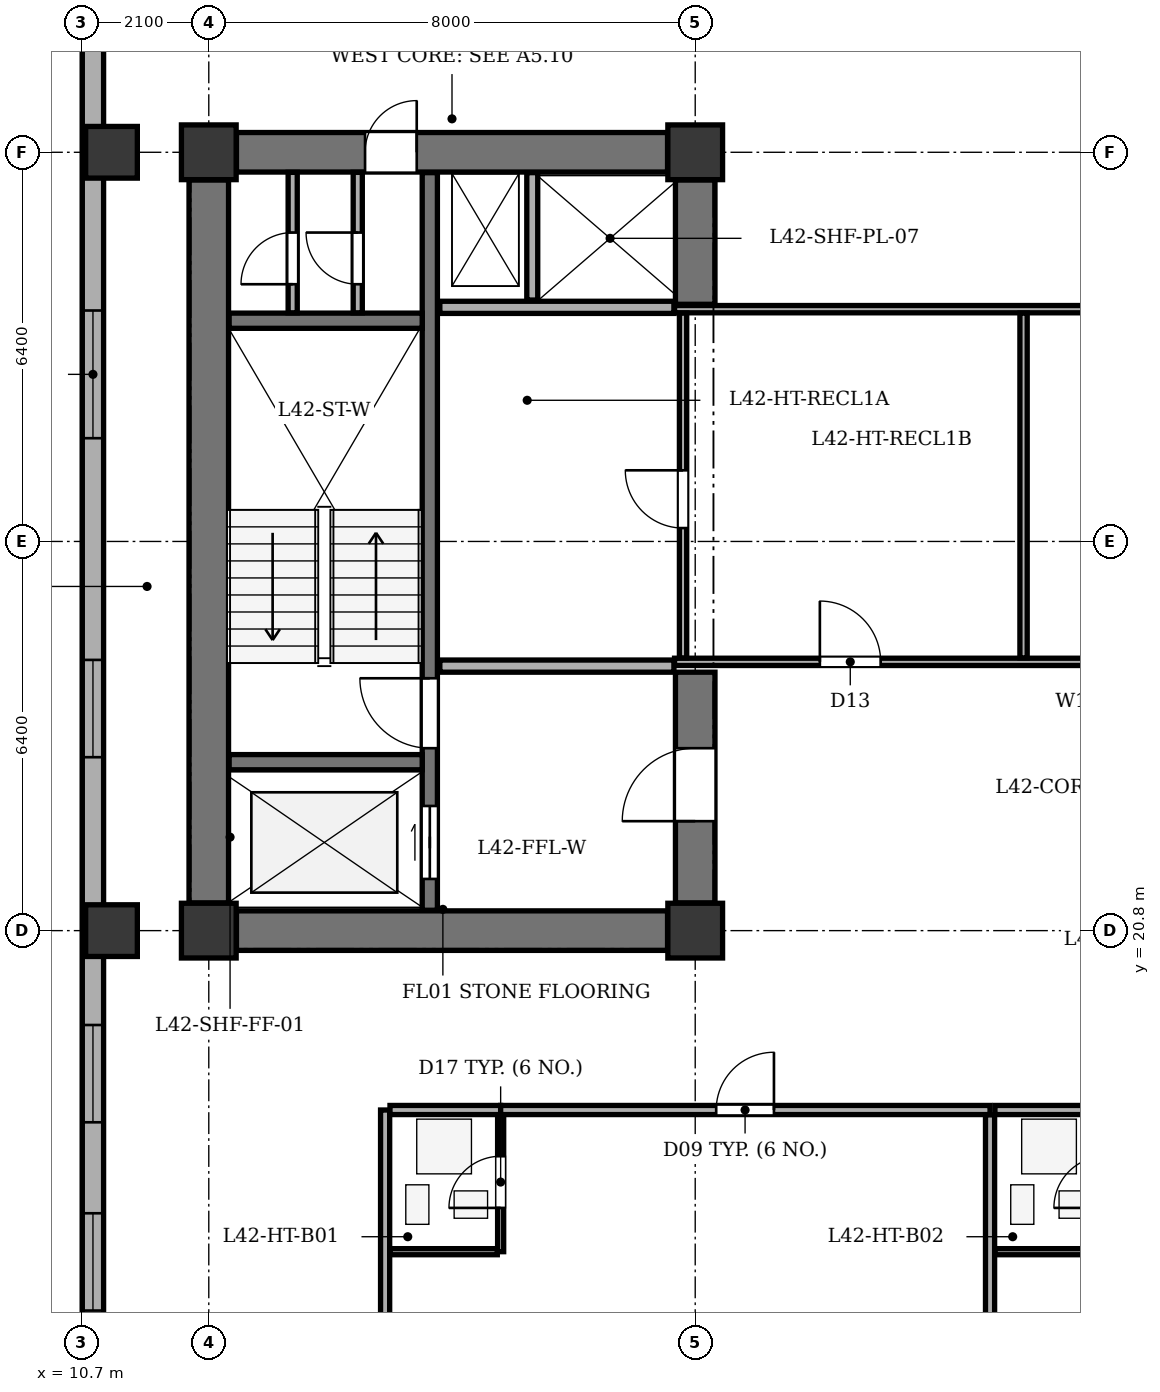
"""IFC4 building model, lengths in metres.
Left out: names, types, materials, properties, quantities, classifications, styles, units other than length and angle.
Written with IfcOpenShell. Run it as: python <this file> out.ifc"""

import sys

from ifc_helpers import new_model, si_unit, direction, frame, frame_2d, origin, origin_2d, place, context, subcontext, project, spatial, rectangle, extrude, element, fill, save


model = new_model("IFC4")
c1 = context("Model", 3, precision=1e-05, world=origin(), true_north=direction((0.0, 1.0)))
c2 = subcontext(c1, "Body", "Model", "MODEL_VIEW")
j1 = project(units=[si_unit("LENGTHUNIT", "METRE"), si_unit("PLANEANGLEUNIT", "RADIAN")], contexts=[c1])
p1 = place(None, origin())
s1 = spatial("IfcSite", under=j1, at=p1, CompositionType="ELEMENT")
p2 = place(p1, origin())
s2 = spatial("IfcBuilding", under=s1, at=p2, CompositionType="ELEMENT")
p3 = place(p2, frame((0.0, 0.0, 165.8)))
s3 = spatial("IfcBuildingStorey", under=s2, at=p3, CompositionType="ELEMENT", Elevation=165.8)
for number, where, z_axis, x_axis in (
    (1, (12.8, 20.8, 0.0), (0.0, 0.0, 1.0), (1.0, 0.0, 0.0)),
    (2, (20.8, 20.8, 0.0), (0.0, 0.0, 1.0), (1.0, 0.0, 0.0)),
    (3, (12.8, 33.6, 0.0), (0.0, 0.0, 1.0), (1.0, 0.0, 0.0)),
    (4, (20.8, 33.6, 0.0), (0.0, 0.0, 1.0), (1.0, 0.0, 0.0)),
):
    element("IfcColumn", number, at=place(p3, frame(where, z_axis=z_axis, x_axis=x_axis)), inside=s3, PredefinedType="COLUMN", context=c2, shape_type="SweptSolid", body=[
        extrude(rectangle(XDim=0.9, YDim=0.9, at=origin_2d()), origin(), (0.0, 0.0, 1.0), 3.5),
    ])
for number, where, z_axis, x_axis in (
    (5, (11.2, 20.8, 0.0), (0.0, 0.0, 1.0), (1.0, 0.0, 0.0)),
    (6, (11.2, 33.6, 0.0), (0.0, 0.0, 1.0), (1.0, 0.0, 0.0)),
):
    element("IfcColumn", number, at=place(p3, frame(where, z_axis=z_axis, x_axis=x_axis)), inside=s3, PredefinedType="COLUMN", context=c2, shape_type="SweptSolid", body=[
        extrude(rectangle(XDim=0.85, YDim=0.85, at=origin_2d()), origin(), (0.0, 0.0, 1.0), 3.5),
    ])
p4 = place(p3, frame((10.895, 12.9, 0.0), z_axis=(0.0, 0.0, 1.0), x_axis=(0.0, 1.0, 0.0)))
e7 = element("IfcWall", 7, at=p4, inside=s3, PredefinedType="STANDARD", context=c2, shape_type="SweptSolid", body=[
    extrude(rectangle(XDim=35.0, YDim=0.35, at=frame_2d((17.5, 0.0))), origin(), (0.0, 0.0, 1.0), 2.785),
])
p5 = place(p4, frame((1.652, 0.0, 0.75)))
e8 = element("IfcOpeningElement", 8, at=p5, cuts=e7, PredefinedType="OPENING", context=c2, shape_type="SweptSolid", body=[
    extrude(rectangle(XDim=1.6, YDim=1.75, at=frame_2d((0.8, 0.875))), frame((0.0, 0.185, 0.0), z_axis=(0.0, -1.0, 0.0), x_axis=(1.0, 0.0, 0.0)), (0.0, 0.0, 1.0), 0.37),
])
p6 = place(p4, frame((4.748, 0.0, 0.75)))
e9 = element("IfcOpeningElement", 9, at=p6, cuts=e7, PredefinedType="OPENING", context=c2, shape_type="SweptSolid", body=[
    extrude(rectangle(XDim=1.6, YDim=1.75, at=frame_2d((0.8, 0.875))), frame((0.0, 0.185, 0.0), z_axis=(0.0, -1.0, 0.0), x_axis=(1.0, 0.0, 0.0)), (0.0, 0.0, 1.0), 0.37),
])
p7 = place(p4, frame((10.752, 0.0, 0.75)))
e10 = element("IfcOpeningElement", 10, at=p7, cuts=e7, PredefinedType="OPENING", context=c2, shape_type="SweptSolid", body=[
    extrude(rectangle(XDim=1.6, YDim=1.75, at=frame_2d((0.8, 0.875))), frame((0.0, 0.185, 0.0), z_axis=(0.0, -1.0, 0.0), x_axis=(1.0, 0.0, 0.0)), (0.0, 0.0, 1.0), 0.37),
])
p8 = place(p4, frame((15.998, 0.0, 0.75)))
e11 = element("IfcOpeningElement", 11, at=p8, cuts=e7, PredefinedType="OPENING", context=c2, shape_type="SweptSolid", body=[
    extrude(rectangle(XDim=2.1, YDim=1.75, at=frame_2d((1.05, 0.875))), frame((0.0, 0.185, 0.0), z_axis=(0.0, -1.0, 0.0), x_axis=(1.0, 0.0, 0.0)), (0.0, 0.0, 1.0), 0.37),
])
p9 = place(p4, frame((23.916, 0.0, 0.75)))
e12 = element("IfcOpeningElement", 12, at=p9, cuts=e7, PredefinedType="OPENING", context=c2, shape_type="SweptSolid", body=[
    extrude(rectangle(XDim=1.6, YDim=1.75, at=frame_2d((0.8, 0.875))), frame((0.0, 0.185, 0.0), z_axis=(0.0, -1.0, 0.0), x_axis=(1.0, 0.0, 0.0)), (0.0, 0.0, 1.0), 0.37),
])
p10 = place(p4, frame((29.834, 0.0, 0.75)))
e13 = element("IfcOpeningElement", 13, at=p10, cuts=e7, PredefinedType="OPENING", context=c2, shape_type="SweptSolid", body=[
    extrude(rectangle(XDim=2.1, YDim=1.75, at=frame_2d((1.05, 0.875))), frame((0.0, 0.185, 0.0), z_axis=(0.0, -1.0, 0.0), x_axis=(1.0, 0.0, 0.0)), (0.0, 0.0, 1.0), 0.37),
])
p11 = place(p3, frame((12.8, 21.255, 0.0), z_axis=(0.0, 0.0, 1.0), x_axis=(0.0, 1.0, 0.0)))
e14 = element("IfcWall", 14, at=p11, inside=s3, PredefinedType="SHEAR", context=c2, shape_type="SweptSolid", body=[
    extrude(rectangle(XDim=11.89, YDim=0.65, at=frame_2d((5.945, 0.0))), origin(), (0.0, 0.0, 1.0), 3.2),
])
p12 = place(p3, frame((13.255, 20.8, 0.0), z_axis=(0.0, 0.0, 1.0), x_axis=(1.0, 0.0, 0.0)))
e15 = element("IfcWall", 15, at=p12, inside=s3, PredefinedType="SHEAR", context=c2, shape_type="SweptSolid", body=[
    extrude(rectangle(XDim=7.09, YDim=0.65, at=frame_2d((3.545, 0.0))), origin(), (0.0, 0.0, 1.0), 3.2),
])
p13 = place(p3, frame((13.255, 33.6, 0.0), z_axis=(0.0, 0.0, 1.0), x_axis=(1.0, 0.0, 0.0)))
e16 = element("IfcWall", 16, at=p13, inside=s3, PredefinedType="SHEAR", context=c2, shape_type="SweptSolid", body=[
    extrude(rectangle(XDim=7.09, YDim=0.65, at=frame_2d((3.545, 0.0))), origin(), (0.0, 0.0, 1.0), 3.2),
])
p14 = place(p13, frame((2.115, 0.0, 0.0)))
e17 = element("IfcOpeningElement", 17, at=p14, cuts=e16, PredefinedType="OPENING", context=c2, shape_type="SweptSolid", body=[
    extrude(rectangle(XDim=0.85, YDim=2.02, at=frame_2d((0.425, 1.01))), frame((0.0, 0.335, 0.0), z_axis=(0.0, -1.0, 0.0), x_axis=(1.0, 0.0, 0.0)), (0.0, 0.0, 1.0), 0.67),
])
p15 = place(p3, frame((20.8, 21.255, 0.0), z_axis=(0.0, 0.0, 1.0), x_axis=(0.0, 1.0, 0.0)))
e18 = element("IfcWall", 18, at=p15, inside=s3, PredefinedType="SHEAR", context=c2, shape_type="SweptSolid", body=[
    extrude(rectangle(XDim=3.795, YDim=0.65, at=frame_2d((1.897, 0.0))), origin(), (0.0, 0.0, 1.0), 3.2),
])
p16 = place(p15, frame((1.345, 0.0, 0.0)))
e19 = element("IfcOpeningElement", 19, at=p16, cuts=e18, PredefinedType="OPENING", context=c2, shape_type="SweptSolid", body=[
    extrude(rectangle(XDim=1.2, YDim=2.15, at=frame_2d((0.6, 1.075))), frame((0.0, 0.335, 0.0), z_axis=(0.0, -1.0, 0.0), x_axis=(1.0, 0.0, 0.0)), (0.0, 0.0, 1.0), 0.67),
])
p17 = place(p3, frame((20.8, 31.1, 0.0), z_axis=(0.0, 0.0, 1.0), x_axis=(0.0, 1.0, 0.0)))
e20 = element("IfcWall", 20, at=p17, inside=s3, PredefinedType="SHEAR", context=c2, shape_type="SweptSolid", body=[
    extrude(rectangle(XDim=2.045, YDim=0.65, at=frame_2d((1.022, 0.0))), origin(), (0.0, 0.0, 1.0), 3.2),
])
p18 = place(p3, frame((16.435, 21.135, 0.0), z_axis=(0.0, 0.0, 1.0), x_axis=(0.0, 1.0, 0.0)))
e21 = element("IfcWall", 21, at=p18, inside=s3, PredefinedType="SHEAR", context=c2, shape_type="SweptSolid", body=[
    extrude(rectangle(XDim=12.13, YDim=0.25, at=frame_2d((6.065, 0.0))), origin(), (0.0, 0.0, 1.0), 3.2),
])
p19 = place(p18, frame((0.515, 0.0, 0.0)))
e22 = element("IfcOpeningElement", 22, at=p19, cuts=e21, PredefinedType="OPENING", context=c2, shape_type="SweptSolid", body=[
    extrude(rectangle(XDim=1.2, YDim=2.15, at=frame_2d((0.6, 1.075))), frame((0.0, 0.135, 0.0), z_axis=(0.0, -1.0, 0.0), x_axis=(1.0, 0.0, 0.0)), (0.0, 0.0, 1.0), 0.27),
])
p20 = place(p18, frame((2.665, 0.0, 0.0)))
e23 = element("IfcOpeningElement", 23, at=p20, cuts=e21, PredefinedType="OPENING", context=c2, shape_type="SweptSolid", body=[
    extrude(rectangle(XDim=1.15, YDim=2.15, at=frame_2d((0.575, 1.075))), frame((0.0, 0.135, 0.0), z_axis=(0.0, -1.0, 0.0), x_axis=(1.0, 0.0, 0.0)), (0.0, 0.0, 1.0), 0.27),
])
for number, where, z_axis, x_axis in (
    (24, (13.135, 23.57, 0.0), (0.0, 0.0, 1.0), (1.0, 0.0, 0.0)),
    (25, (13.135, 30.83, 0.0), (0.0, 0.0, 1.0), (1.0, 0.0, 0.0)),
):
    element("IfcWall", number, at=place(p3, frame(where, z_axis=z_axis, x_axis=x_axis)), inside=s3, PredefinedType="SHEAR", context=c2, shape_type="SweptSolid", body=[
        extrude(rectangle(XDim=3.175, YDim=0.25, at=frame_2d((1.587, 0.0))), origin(), (0.0, 0.0, 1.0), 3.2),
    ])
for number, where, z_axis, x_axis in (
    (26, (16.6, 25.15, 0.0), (0.0, 0.0, 1.0), (1.0, 0.0, 0.0)),
    (27, (16.6, 31.05, 0.0), (0.0, 0.0, 1.0), (1.0, 0.0, 0.0)),
):
    element("IfcWall", number, at=place(p3, frame(where, z_axis=z_axis, x_axis=x_axis)), inside=s3, PredefinedType="SOLIDWALL", context=c2, shape_type="SweptSolid", body=[
        extrude(rectangle(XDim=3.85, YDim=0.2, at=frame_2d((1.925, 0.0))), origin(), (0.0, 0.0, 1.0), 3.2),
    ])
p21 = place(p3, frame((18.12, 31.17, 0.0), z_axis=(0.0, 0.0, 1.0), x_axis=(0.0, 1.0, 0.0)))
e28 = element("IfcWall", 28, at=p21, inside=s3, PredefinedType="PARTITIONING", context=c2, shape_type="SweptSolid", body=[
    extrude(rectangle(XDim=2.095, YDim=0.18, at=frame_2d((1.047, 0.0))), origin(), (0.0, 0.0, 1.0), 3.2),
])
p22 = place(p3, frame((14.18, 30.96, 0.0), z_axis=(0.0, 0.0, 1.0), x_axis=(0.0, 1.0, 0.0)))
e29 = element("IfcWall", 29, at=p22, inside=s3, PredefinedType="PARTITIONING", context=c2, shape_type="SweptSolid", body=[
    extrude(rectangle(XDim=2.31, YDim=0.15, at=frame_2d((1.155, 0.0))), origin(), (0.0, 0.0, 1.0), 3.2),
])
p23 = place(p22, frame((0.47, 0.0, 0.0)))
e30 = element("IfcOpeningElement", 30, at=p23, cuts=e29, PredefinedType="OPENING", context=c2, shape_type="SweptSolid", body=[
    extrude(rectangle(XDim=0.85, YDim=2.02, at=frame_2d((0.425, 1.01))), frame((0.0, 0.085, 0.0), z_axis=(0.0, -1.0, 0.0), x_axis=(1.0, 0.0, 0.0)), (0.0, 0.0, 1.0), 0.17),
])
p24 = place(p3, frame((15.25, 30.96, 0.0), z_axis=(0.0, 0.0, 1.0), x_axis=(0.0, 1.0, 0.0)))
e31 = element("IfcWall", 31, at=p24, inside=s3, PredefinedType="PARTITIONING", context=c2, shape_type="SweptSolid", body=[
    extrude(rectangle(XDim=2.31, YDim=0.15, at=frame_2d((1.155, 0.0))), origin(), (0.0, 0.0, 1.0), 3.2),
])
p25 = place(p24, frame((0.47, 0.0, 0.0)))
e32 = element("IfcOpeningElement", 32, at=p25, cuts=e31, PredefinedType="OPENING", context=c2, shape_type="SweptSolid", body=[
    extrude(rectangle(XDim=0.85, YDim=2.02, at=frame_2d((0.425, 1.01))), frame((0.0, 0.085, 0.0), z_axis=(0.0, -1.0, 0.0), x_axis=(1.0, 0.0, 0.0)), (0.0, 0.0, 1.0), 0.17),
])
p26 = place(p3, frame((20.46, 25.22, 0.0), z_axis=(0.0, 0.0, 1.0), x_axis=(1.0, 0.0, 0.0)))
e33 = element("IfcWall", 33, at=p26, inside=s3, PredefinedType="PARTITIONING", context=c2, shape_type="SweptSolid", body=[
    extrude(rectangle(XDim=11.94, YDim=0.12, at=frame_2d((5.97, 0.0))), origin(), (0.0, 0.0, 1.0), 3.2),
])
p27 = place(p26, frame((2.39, 0.0, 0.0)))
e34 = element("IfcOpeningElement", 34, at=p27, cuts=e33, PredefinedType="OPENING", context=c2, shape_type="SweptSolid", body=[
    extrude(rectangle(XDim=1.0, YDim=2.1, at=frame_2d((0.5, 1.05))), frame((0.0, 0.07, 0.0), z_axis=(0.0, -1.0, 0.0), x_axis=(1.0, 0.0, 0.0)), (0.0, 0.0, 1.0), 0.14),
])
p28 = place(p3, frame((20.46, 31.02, 0.0), z_axis=(0.0, 0.0, 1.0), x_axis=(1.0, 0.0, 0.0)))
e35 = element("IfcWall", 35, at=p28, inside=s3, PredefinedType="PARTITIONING", context=c2, shape_type="SweptSolid", body=[
    extrude(rectangle(XDim=11.94, YDim=0.12, at=frame_2d((5.97, 0.0))), origin(), (0.0, 0.0, 1.0), 3.2),
])
p29 = place(p3, frame((20.6, 25.285, 0.0), z_axis=(0.0, 0.0, 1.0), x_axis=(0.0, 1.0, 0.0)))
e36 = element("IfcWall", 36, at=p29, inside=s3, PredefinedType="PARTITIONING", context=c2, shape_type="SweptSolid", body=[
    extrude(rectangle(XDim=5.67, YDim=0.12, at=frame_2d((2.835, 0.0))), origin(), (0.0, 0.0, 1.0), 2.735),
])
p30 = place(p29, frame((2.135, 0.0, 0.0)))
e37 = element("IfcOpeningElement", 37, at=p30, cuts=e36, PredefinedType="OPENING", context=c2, shape_type="SweptSolid", body=[
    extrude(rectangle(XDim=0.95, YDim=2.1, at=frame_2d((0.475, 1.05))), frame((0.0, 0.07, 0.0), z_axis=(0.0, -1.0, 0.0), x_axis=(1.0, 0.0, 0.0)), (0.0, 0.0, 1.0), 0.14),
])
p31 = place(p3, frame((26.2, 25.285, 0.0), z_axis=(0.0, 0.0, 1.0), x_axis=(0.0, 1.0, 0.0)))
e38 = element("IfcWall", 38, at=p31, inside=s3, PredefinedType="PARTITIONING", context=c2, shape_type="SweptSolid", body=[
    extrude(rectangle(XDim=5.67, YDim=0.12, at=frame_2d((2.835, 0.0))), origin(), (0.0, 0.0, 1.0), 3.2),
])
p32 = place(p3, frame((15.7, 8.275, 0.0), z_axis=(0.0, 0.0, 1.0), x_axis=(0.0, 1.0, 0.0)))
e39 = element("IfcWall", 39, at=p32, inside=s3, PredefinedType="PARTITIONING", context=c2, shape_type="SweptSolid", body=[
    extrude(rectangle(XDim=9.575, YDim=0.15, at=frame_2d((4.788, 0.0))), origin(), (0.0, 0.0, 1.0), 3.2),
])
p33 = place(p3, frame((15.78, 17.85, 0.0), z_axis=(0.0, 0.0, 1.0), x_axis=(1.0, 0.0, 0.0)))
e40 = element("IfcWall", 40, at=p33, inside=s3, PredefinedType="PARTITIONING", context=c2, shape_type="SweptSolid", body=[
    extrude(rectangle(XDim=1.82, YDim=0.15, at=frame_2d((0.91, 0.0))), origin(), (0.0, 0.0, 1.0), 3.2),
])
p34 = place(p3, frame((17.6, 17.85, 0.0), z_axis=(0.0, 0.0, 1.0), x_axis=(1.0, 0.0, 0.0)))
e41 = element("IfcWall", 41, at=p34, inside=s3, PredefinedType="PARTITIONING", context=c2, shape_type="SweptSolid", body=[
    extrude(rectangle(XDim=8.049, YDim=0.15, at=frame_2d((4.024, 0.0))), origin(), (0.0, 0.0, 1.0), 3.2),
])
p35 = place(p34, frame((3.545, 0.0, 0.0)))
e42 = element("IfcOpeningElement", 42, at=p35, cuts=e41, PredefinedType="OPENING", context=c2, shape_type="SweptSolid", body=[
    extrude(rectangle(XDim=0.95, YDim=2.1, at=frame_2d((0.475, 1.05))), frame((0.0, 0.085, 0.0), z_axis=(0.0, -1.0, 0.0), x_axis=(1.0, 0.0, 0.0)), (0.0, 0.0, 1.0), 0.17),
])
p36 = place(p3, frame((17.6, 15.52, 0.0), z_axis=(0.0, 0.0, 1.0), x_axis=(0.0, 1.0, 0.0)))
e43 = element("IfcWall", 43, at=p36, inside=s3, PredefinedType="PARTITIONING", context=c2, shape_type="SweptSolid", body=[
    extrude(rectangle(XDim=2.25, YDim=0.1, at=frame_2d((1.125, 0.0))), origin(), (0.0, 0.0, 1.0), 3.2),
])
p37 = place(p36, frame((0.72, 0.0, 0.0)))
e44 = element("IfcOpeningElement", 44, at=p37, cuts=e43, PredefinedType="OPENING", context=c2, shape_type="SweptSolid", body=[
    extrude(rectangle(XDim=0.85, YDim=2.05, at=frame_2d((0.425, 1.025))), frame((0.0, 0.06, 0.0), z_axis=(0.0, -1.0, 0.0), x_axis=(1.0, 0.0, 0.0)), (0.0, 0.0, 1.0), 0.12),
])
p38 = place(p3, frame((15.78, 15.52, 0.0), z_axis=(0.0, 0.0, 1.0), x_axis=(1.0, 0.0, 0.0)))
e45 = element("IfcWall", 45, at=p38, inside=s3, PredefinedType="PARTITIONING", context=c2, shape_type="SweptSolid", body=[
    extrude(rectangle(XDim=1.765, YDim=0.1, at=frame_2d((0.882, 0.0))), origin(), (0.0, 0.0, 1.0), 3.2),
])
p39 = place(p3, frame((25.649, 8.275, 0.0), z_axis=(0.0, 0.0, 1.0), x_axis=(0.0, 1.0, 0.0)))
e46 = element("IfcWall", 46, at=p39, inside=s3, PredefinedType="PARTITIONING", context=c2, shape_type="SweptSolid", body=[
    extrude(rectangle(XDim=9.495, YDim=0.15, at=frame_2d((4.748, 0.0))), origin(), (0.0, 0.0, 1.0), 3.2),
])
p40 = place(p3, frame((25.729, 17.85, 0.0), z_axis=(0.0, 0.0, 1.0), x_axis=(1.0, 0.0, 0.0)))
e47 = element("IfcWall", 47, at=p40, inside=s3, PredefinedType="PARTITIONING", context=c2, shape_type="SweptSolid", body=[
    extrude(rectangle(XDim=1.82, YDim=0.15, at=frame_2d((0.91, 0.0))), origin(), (0.0, 0.0, 1.0), 3.2),
])
p41 = place(p3, frame((25.729, 15.52, 0.0), z_axis=(0.0, 0.0, 1.0), x_axis=(1.0, 0.0, 0.0)))
e48 = element("IfcWall", 48, at=p41, inside=s3, PredefinedType="PARTITIONING", context=c2, shape_type="SweptSolid", body=[
    extrude(rectangle(XDim=1.765, YDim=0.1, at=frame_2d((0.882, 0.0))), origin(), (0.0, 0.0, 1.0), 3.2),
])
p42 = place(p5, origin())
e49 = element("IfcWindow", 49, at=p42, inside=s3, PartitioningType="SINGLE_PANEL", PredefinedType="WINDOW", context=c2, shape_type="SweptSolid", body=[
    extrude(rectangle(XDim=1.6, YDim=1.75, at=frame_2d((0.8, 0.875))), frame((0.0, -0.01, 0.0), z_axis=(0.0, -1.0, 0.0), x_axis=(1.0, 0.0, 0.0)), (0.0, 0.0, 1.0), 0.06),
])
fill(e8, e49)
p43 = place(p6, origin())
e50 = element("IfcWindow", 50, at=p43, inside=s3, PartitioningType="SINGLE_PANEL", PredefinedType="WINDOW", context=c2, shape_type="SweptSolid", body=[
    extrude(rectangle(XDim=1.6, YDim=1.75, at=frame_2d((0.8, 0.875))), frame((0.0, -0.01, 0.0), z_axis=(0.0, -1.0, 0.0), x_axis=(1.0, 0.0, 0.0)), (0.0, 0.0, 1.0), 0.06),
])
fill(e9, e50)
p44 = place(p7, origin())
e51 = element("IfcWindow", 51, at=p44, inside=s3, PartitioningType="SINGLE_PANEL", PredefinedType="WINDOW", context=c2, shape_type="SweptSolid", body=[
    extrude(rectangle(XDim=1.6, YDim=1.75, at=frame_2d((0.8, 0.875))), frame((0.0, -0.01, 0.0), z_axis=(0.0, -1.0, 0.0), x_axis=(1.0, 0.0, 0.0)), (0.0, 0.0, 1.0), 0.06),
])
fill(e10, e51)
p45 = place(p8, origin())
e52 = element("IfcWindow", 52, at=p45, inside=s3, PartitioningType="SINGLE_PANEL", PredefinedType="WINDOW", context=c2, shape_type="SweptSolid", body=[
    extrude(rectangle(XDim=2.1, YDim=1.75, at=frame_2d((1.05, 0.875))), frame((0.0, -0.01, 0.0), z_axis=(0.0, -1.0, 0.0), x_axis=(1.0, 0.0, 0.0)), (0.0, 0.0, 1.0), 0.06),
])
fill(e11, e52)
p46 = place(p14, origin())
e53 = element("IfcDoor", 53, at=p46, inside=s3, OperationType="SINGLE_SWING_RIGHT", PredefinedType="DOOR", context=c2, shape_type="SweptSolid", body=[
    extrude(rectangle(XDim=0.85, YDim=2.02, at=frame_2d((0.425, 1.01))), frame((0.0, 0.025, 0.0), z_axis=(0.0, -1.0, 0.0), x_axis=(1.0, 0.0, 0.0)), (0.0, 0.0, 1.0), 0.05),
])
fill(e17, e53)
p47 = place(p16, origin())
e54 = element("IfcDoor", 54, at=p47, inside=s3, OperationType="SINGLE_SWING_LEFT", PredefinedType="DOOR", context=c2, shape_type="SweptSolid", body=[
    extrude(rectangle(XDim=1.2, YDim=2.15, at=frame_2d((0.6, 1.075))), frame((0.0, 0.025, 0.0), z_axis=(0.0, -1.0, 0.0), x_axis=(1.0, 0.0, 0.0)), (0.0, 0.0, 1.0), 0.05),
])
fill(e19, e54)
p48 = place(p19, origin())
e55 = element("IfcDoor", 55, at=p48, inside=s3, OperationType="DOUBLE_DOOR_SLIDING", PredefinedType="DOOR", context=c2, shape_type="SweptSolid", body=[
    extrude(rectangle(XDim=1.2, YDim=2.15, at=frame_2d((0.6, 1.075))), frame((0.0, 0.025, 0.0), z_axis=(0.0, -1.0, 0.0), x_axis=(1.0, 0.0, 0.0)), (0.0, 0.0, 1.0), 0.05),
])
fill(e22, e55)
p49 = place(p20, origin())
e56 = element("IfcDoor", 56, at=p49, inside=s3, OperationType="SINGLE_SWING_RIGHT", PredefinedType="DOOR", context=c2, shape_type="SweptSolid", body=[
    extrude(rectangle(XDim=1.15, YDim=2.15, at=frame_2d((0.575, 1.075))), frame((0.0, 0.025, 0.0), z_axis=(0.0, -1.0, 0.0), x_axis=(1.0, 0.0, 0.0)), (0.0, 0.0, 1.0), 0.05),
])
fill(e23, e56)
p50 = place(p23, origin())
e57 = element("IfcDoor", 57, at=p50, inside=s3, OperationType="SINGLE_SWING_LEFT", PredefinedType="DOOR", context=c2, shape_type="SweptSolid", body=[
    extrude(rectangle(XDim=0.85, YDim=2.02, at=frame_2d((0.425, 1.01))), frame((0.0, 0.025, 0.0), z_axis=(0.0, -1.0, 0.0), x_axis=(1.0, 0.0, 0.0)), (0.0, 0.0, 1.0), 0.05),
])
fill(e30, e57)
p51 = place(p25, origin())
e58 = element("IfcDoor", 58, at=p51, inside=s3, OperationType="SINGLE_SWING_RIGHT", PredefinedType="DOOR", context=c2, shape_type="SweptSolid", body=[
    extrude(rectangle(XDim=0.85, YDim=2.02, at=frame_2d((0.425, 1.01))), frame((0.0, 0.025, 0.0), z_axis=(0.0, -1.0, 0.0), x_axis=(1.0, 0.0, 0.0)), (0.0, 0.0, 1.0), 0.05),
])
fill(e32, e58)
p52 = place(p30, origin())
e59 = element("IfcDoor", 59, at=p52, inside=s3, OperationType="SINGLE_SWING_RIGHT", PredefinedType="DOOR", context=c2, shape_type="SweptSolid", body=[
    extrude(rectangle(XDim=0.95, YDim=2.1, at=frame_2d((0.475, 1.05))), frame((0.0, 0.025, 0.0), z_axis=(0.0, -1.0, 0.0), x_axis=(1.0, 0.0, 0.0)), (0.0, 0.0, 1.0), 0.05),
])
fill(e37, e59)
p53 = place(p27, origin())
e60 = element("IfcDoor", 60, at=p53, inside=s3, OperationType="SINGLE_SWING_LEFT", PredefinedType="DOOR", context=c2, shape_type="SweptSolid", body=[
    extrude(rectangle(XDim=1.0, YDim=2.1, at=frame_2d((0.5, 1.05))), frame((0.0, 0.025, 0.0), z_axis=(0.0, -1.0, 0.0), x_axis=(1.0, 0.0, 0.0)), (0.0, 0.0, 1.0), 0.05),
])
fill(e34, e60)
p54 = place(p37, origin())
e61 = element("IfcDoor", 61, at=p54, inside=s3, OperationType="SINGLE_SWING_LEFT", PredefinedType="DOOR", context=c2, shape_type="SweptSolid", body=[
    extrude(rectangle(XDim=0.85, YDim=2.05, at=frame_2d((0.425, 1.025))), frame((0.0, 0.025, 0.0), z_axis=(0.0, -1.0, 0.0), x_axis=(1.0, 0.0, 0.0)), (0.0, 0.0, 1.0), 0.05),
])
fill(e44, e61)
p55 = place(p35, origin())
e62 = element("IfcDoor", 62, at=p55, inside=s3, OperationType="SINGLE_SWING_RIGHT", PredefinedType="DOOR", context=c2, shape_type="SweptSolid", body=[
    extrude(rectangle(XDim=0.95, YDim=2.1, at=frame_2d((0.475, 1.05))), frame((0.0, 0.025, 0.0), z_axis=(0.0, -1.0, 0.0), x_axis=(1.0, 0.0, 0.0)), (0.0, 0.0, 1.0), 0.05),
])
fill(e42, e62)
save(model, sys.argv[1])
